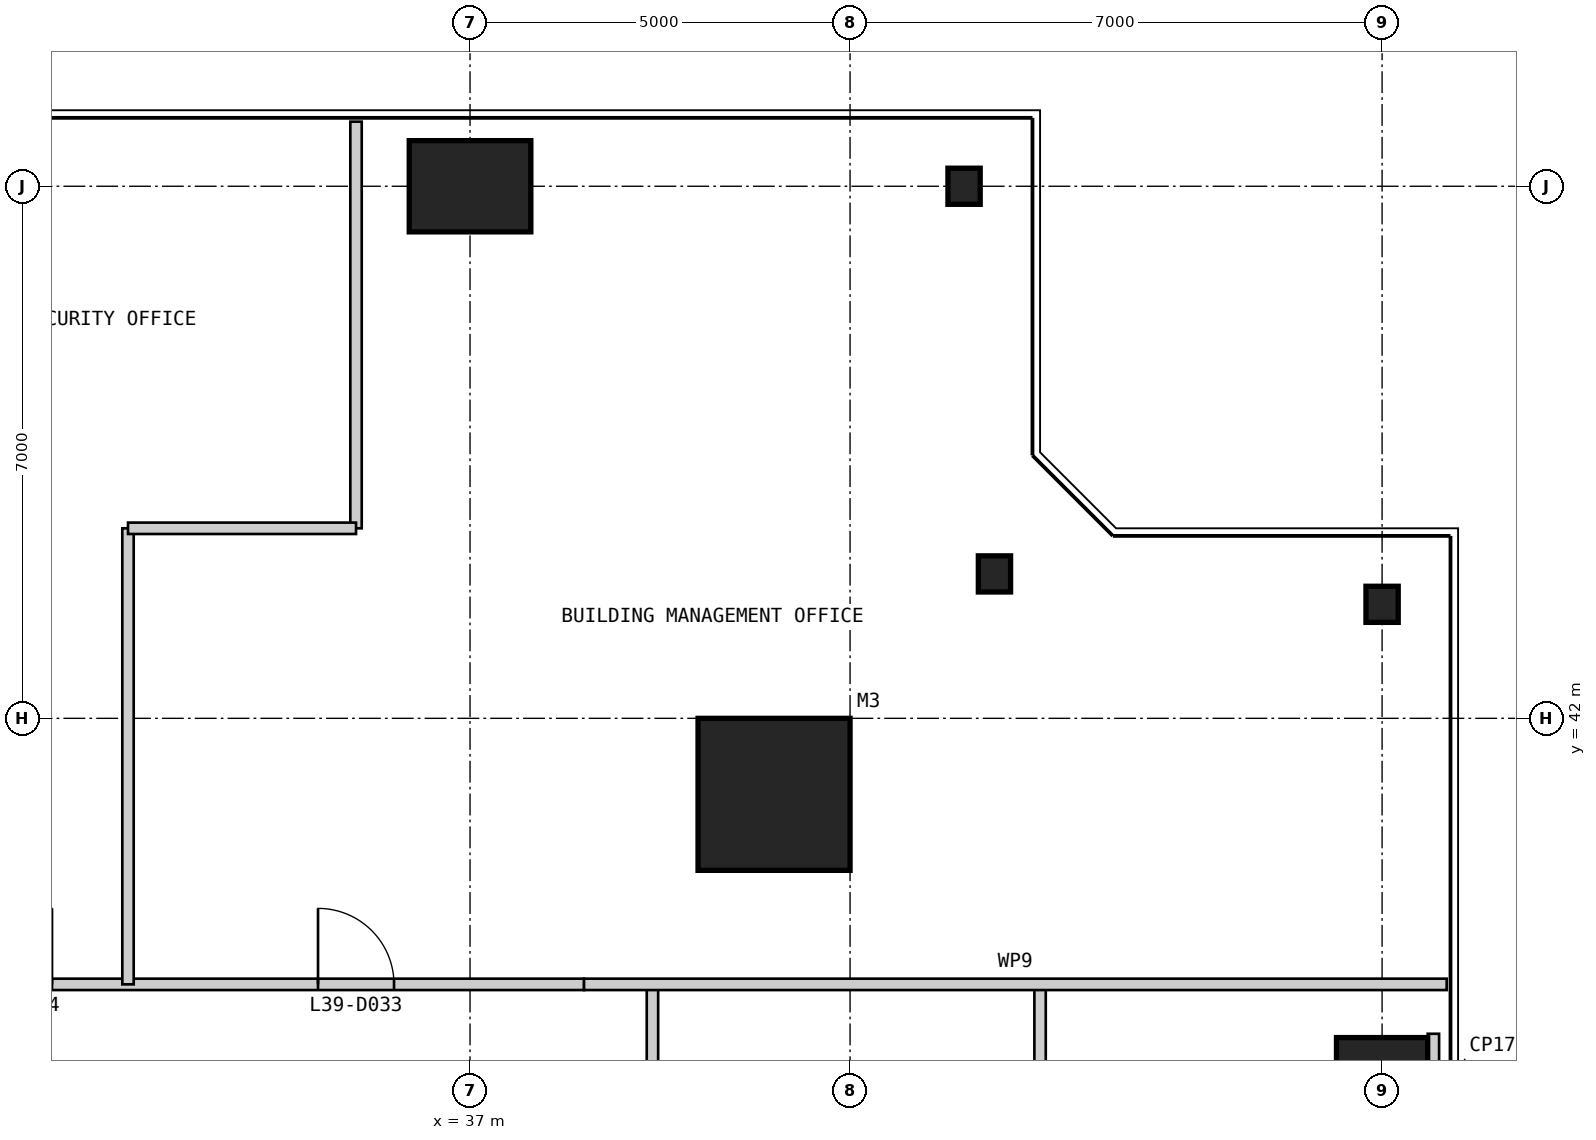
"""IFC4 building model, lengths in metres.
Left out: names, types, materials, properties, quantities, classifications, styles, units other than length and angle.
Written with IfcOpenShell. Run it as: python <this file> out.ifc"""

import sys

from ifc_helpers import new_model, si_unit, direction, frame, frame_2d, origin, origin_2d, place, context, subcontext, project, spatial, rectangle, i_section, extrude, element, fill, save


model = new_model("IFC4")
c1 = context("Model", 3, precision=1e-05, world=origin(), true_north=direction((0.0, 1.0)))
c2 = subcontext(c1, "Body", "Model", "MODEL_VIEW")
j1 = project(units=[si_unit("LENGTHUNIT", "METRE"), si_unit("PLANEANGLEUNIT", "RADIAN")], contexts=[c1])
p1 = place(None, origin())
s1 = spatial("IfcSite", under=j1, at=p1, CompositionType="ELEMENT")
p2 = place(p1, origin())
s2 = spatial("IfcBuilding", under=s1, at=p2, CompositionType="ELEMENT")
p3 = place(p2, frame((0.0, 0.0, 168.4)))
s3 = spatial("IfcBuildingStorey", under=s2, at=p3, CompositionType="ELEMENT", Elevation=168.4)
p4 = place(p3, frame((41.0, 41.0, 0.0), z_axis=(0.0, 0.0, 1.0), x_axis=(1.0, 0.0, 0.0)))
e1 = element("IfcColumn", 1, at=p4, inside=s3, PredefinedType="COLUMN", context=c2, shape_type="SweptSolid", body=[
    extrude(rectangle(XDim=2.0, YDim=2.0, at=origin_2d()), origin(), (0.0, 0.0, 1.0), 5.4),
])
p5 = place(p3, frame((49.0, 37.0, 0.0), z_axis=(0.0, 0.0, 1.0), x_axis=(1.0, 0.0, 0.0)))
e2 = element("IfcColumn", 2, at=p5, inside=s3, PredefinedType="COLUMN", context=c2, shape_type="SweptSolid", body=[
    extrude(rectangle(XDim=1.2, YDim=1.6, at=origin_2d()), origin(), (0.0, 0.0, 1.0), 5.4),
])
for number, where, z_axis, x_axis in (
    (3, (49.0, 43.5, 0.0), (0.0, 0.0, 1.0), (1.0, 0.0, 0.0)),
    (4, (43.9, 43.9, 0.0), (0.0, 0.0, 1.0), (1.0, 0.0, 0.0)),
    (5, (43.5, 49.0, 0.0), (0.0, 0.0, 1.0), (1.0, 0.0, 0.0)),
):
    element("IfcColumn", number, at=place(p3, frame(where, z_axis=z_axis, x_axis=x_axis)), inside=s3, PredefinedType="COLUMN", context=c2, shape_type="SweptSolid", body=[
        extrude(i_section(OverallWidth=0.424, OverallDepth=0.475, WebThickness=0.048, FlangeThickness=0.077, at=origin_2d()), origin(), (0.0, 0.0, 1.0), 5.4),
    ])
p6 = place(p3, frame((37.0, 49.0, 0.0), z_axis=(0.0, 0.0, 1.0), x_axis=(1.0, 0.0, 0.0)))
e6 = element("IfcColumn", 6, at=p6, inside=s3, PredefinedType="COLUMN", context=c2, shape_type="SweptSolid", body=[
    extrude(rectangle(XDim=1.6, YDim=1.2, at=origin_2d()), origin(), (0.0, 0.0, 1.0), 5.4),
])
p7 = place(p3, frame((39.4, 10.6, 0.0), z_axis=(0.0, 0.0, 1.0), x_axis=(0.0, 1.0, 0.0)))
e7 = element("IfcWall", 7, at=p7, inside=s3, PredefinedType="PARTITIONING", context=c2, shape_type="SweptSolid", body=[
    extrude(rectangle(XDim=27.9, YDim=0.15, at=frame_2d((13.95, 0.0))), origin(), (0.0, 0.0, 1.0), 5.25),
])
p8 = place(p7, frame((1.15, 0.0, 0.0)))
e8 = element("IfcOpeningElement", 8, at=p8, cuts=e7, PredefinedType="OPENING", context=c2, shape_type="SweptSolid", body=[
    extrude(rectangle(XDim=1.0, YDim=2.2, at=frame_2d((0.5, 1.1))), frame((0.0, 0.085, 0.0), z_axis=(0.0, -1.0, 0.0), x_axis=(1.0, 0.0, 0.0)), (0.0, 0.0, 1.0), 0.17),
])
p9 = place(p7, frame((17.65, 0.0, 0.0)))
e9 = element("IfcOpeningElement", 9, at=p9, cuts=e7, PredefinedType="OPENING", context=c2, shape_type="SweptSolid", body=[
    extrude(rectangle(XDim=1.0, YDim=2.2, at=frame_2d((0.5, 1.1))), frame((0.0, 0.085, 0.0), z_axis=(0.0, -1.0, 0.0), x_axis=(1.0, 0.0, 0.0)), (0.0, 0.0, 1.0), 0.17),
])
p10 = place(p7, frame((24.4, 0.0, 0.0)))
e10 = element("IfcOpeningElement", 10, at=p10, cuts=e7, PredefinedType="OPENING", context=c2, shape_type="SweptSolid", body=[
    extrude(rectangle(XDim=1.0, YDim=2.2, at=frame_2d((0.5, 1.1))), frame((0.0, 0.085, 0.0), z_axis=(0.0, -1.0, 0.0), x_axis=(1.0, 0.0, 0.0)), (0.0, 0.0, 1.0), 0.17),
])
p11 = place(p3, frame((44.5, 32.5, 0.0), z_axis=(0.0, 0.0, 1.0), x_axis=(0.0, 1.0, 0.0)))
e11 = element("IfcWall", 11, at=p11, inside=s3, PredefinedType="PARTITIONING", context=c2, shape_type="SweptSolid", body=[
    extrude(rectangle(XDim=6.0, YDim=0.15, at=frame_2d((3.0, 0.0))), origin(), (0.0, 0.0, 1.0), 5.25),
])
p12 = place(p3, frame((38.5, 38.5, 0.0), z_axis=(0.0, 0.0, 1.0), x_axis=(-1.0, 0.0, 0.0)))
e12 = element("IfcWall", 12, at=p12, inside=s3, PredefinedType="PARTITIONING", context=c2, shape_type="SweptSolid", body=[
    extrude(rectangle(XDim=27.0, YDim=0.15, at=frame_2d((13.5, 0.0))), origin(), (0.0, 0.0, 1.0), 5.25),
])
p13 = place(p12, frame((2.5, 0.0, 0.0)))
e13 = element("IfcOpeningElement", 13, at=p13, cuts=e12, PredefinedType="OPENING", context=c2, shape_type="SweptSolid", body=[
    extrude(rectangle(XDim=1.0, YDim=2.2, at=frame_2d((0.5, 1.1))), frame((0.0, 0.085, 0.0), z_axis=(0.0, -1.0, 0.0), x_axis=(1.0, 0.0, 0.0)), (0.0, 0.0, 1.0), 0.17),
])
p14 = place(p12, frame((7.0, 0.0, 0.0)))
e14 = element("IfcOpeningElement", 14, at=p14, cuts=e12, PredefinedType="OPENING", context=c2, shape_type="SweptSolid", body=[
    extrude(rectangle(XDim=1.0, YDim=2.2, at=frame_2d((0.5, 1.1))), frame((0.0, 0.085, 0.0), z_axis=(0.0, -1.0, 0.0), x_axis=(1.0, 0.0, 0.0)), (0.0, 0.0, 1.0), 0.17),
])
p15 = place(p12, frame((14.5, 0.0, 0.0)))
e15 = element("IfcOpeningElement", 15, at=p15, cuts=e12, PredefinedType="OPENING", context=c2, shape_type="SweptSolid", body=[
    extrude(rectangle(XDim=1.0, YDim=2.2, at=frame_2d((0.5, 1.1))), frame((0.0, 0.085, 0.0), z_axis=(0.0, -1.0, 0.0), x_axis=(1.0, 0.0, 0.0)), (0.0, 0.0, 1.0), 0.17),
])
p16 = place(p3, frame((49.85, 38.5, 0.0), z_axis=(0.0, 0.0, 1.0), x_axis=(-1.0, 0.0, 0.0)))
e16 = element("IfcWall", 16, at=p16, inside=s3, PredefinedType="PARTITIONING", context=c2, shape_type="SweptSolid", body=[
    extrude(rectangle(XDim=11.35, YDim=0.15, at=frame_2d((5.675, 0.0))), origin(), (0.0, 0.0, 1.0), 5.25),
])
p17 = place(p3, frame((35.5, 49.85, 0.0), z_axis=(0.0, 0.0, 1.0), x_axis=(0.0, -1.0, 0.0)))
e17 = element("IfcWall", 17, at=p17, inside=s3, PredefinedType="PARTITIONING", context=c2, shape_type="SweptSolid", body=[
    extrude(rectangle(XDim=5.35, YDim=0.15, at=frame_2d((2.675, 0.0))), origin(), (0.0, 0.0, 1.0), 5.25),
])
p18 = place(p3, frame((32.5, 44.5, 0.0), z_axis=(0.0, 0.0, 1.0), x_axis=(0.0, -1.0, 0.0)))
e18 = element("IfcWall", 18, at=p18, inside=s3, PredefinedType="PARTITIONING", context=c2, shape_type="SweptSolid", body=[
    extrude(rectangle(XDim=6.0, YDim=0.15, at=frame_2d((3.0, 0.0))), origin(), (0.0, 0.0, 1.0), 5.25),
])
p19 = place(p3, frame((35.5, 44.5, 0.0), z_axis=(0.0, 0.0, 1.0), x_axis=(-1.0, 0.0, 0.0)))
e19 = element("IfcWall", 19, at=p19, inside=s3, PredefinedType="PARTITIONING", context=c2, shape_type="SweptSolid", body=[
    extrude(rectangle(XDim=3.0, YDim=0.15, at=frame_2d((1.5, 0.0))), origin(), (0.0, 0.0, 1.0), 5.25),
])
p20 = place(p3, frame((49.75, 37.0, 0.0), z_axis=(0.0, 0.0, 1.0), x_axis=(-1.0, 0.0, 0.0)))
e20 = element("IfcWall", 20, at=p20, inside=s3, PredefinedType="PARTITIONING", context=c2, shape_type="SweptSolid", body=[
    extrude(rectangle(XDim=0.15, YDim=1.7, at=frame_2d((0.075, 0.0))), origin(), (0.0, 0.0, 1.0), 5.25),
])
p21 = place(p13, frame((1.0, 0.0, 0.0), z_axis=(0.0, 0.0, 1.0), x_axis=(-1.0, 0.0, 0.0)))
e21 = element("IfcDoor", 21, at=p21, inside=s3, OperationType="SINGLE_SWING_LEFT", PredefinedType="DOOR", context=c2, shape_type="SweptSolid", body=[
    extrude(rectangle(XDim=1.0, YDim=2.2, at=frame_2d((0.5, 1.1))), frame((0.0, 0.025, 0.0), z_axis=(0.0, -1.0, 0.0), x_axis=(1.0, 0.0, 0.0)), (0.0, 0.0, 1.0), 0.05),
])
fill(e13, e21)
save(model, sys.argv[1])
